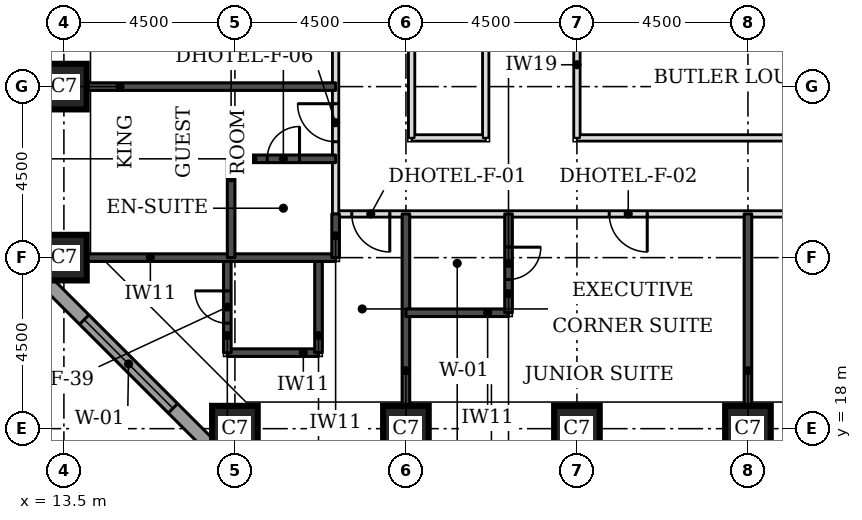
"""IFC4 building model, lengths in metres.
Left out: names, types, materials, properties, quantities, classifications, styles, units other than length and angle.
Written with IfcOpenShell. Run it as: python <this file> out.ifc"""

import sys

from ifc_helpers import new_model, si_unit, direction, frame, frame_2d, origin, origin_2d, place, context, subcontext, project, spatial, rectangle, extrude, element, fill, save


model = new_model("IFC4")
c1 = context("Model", 3, precision=1e-05, world=origin(), true_north=direction((0.0, 1.0)))
c2 = subcontext(c1, "Body", "Model", "MODEL_VIEW")
j1 = project(units=[si_unit("LENGTHUNIT", "METRE"), si_unit("PLANEANGLEUNIT", "RADIAN")], contexts=[c1])
p1 = place(None, origin())
s1 = spatial("IfcSite", under=j1, at=p1, CompositionType="ELEMENT")
p2 = place(p1, origin())
s2 = spatial("IfcBuilding", under=s1, at=p2, CompositionType="ELEMENT")
p3 = place(p2, frame((0.0, 0.0, 42.9)))
s3 = spatial("IfcBuildingStorey", under=s2, at=p3, CompositionType="ELEMENT", Elevation=42.9)
for number, where, z_axis, x_axis in (
    (1, (18.0, 18.0, 0.0), (0.0, 0.0, 1.0), (1.0, 0.0, 0.0)),
    (2, (22.5, 18.0, 0.0), (0.0, 0.0, 1.0), (1.0, 0.0, 0.0)),
    (3, (27.0, 18.0, 0.0), (0.0, 0.0, 1.0), (1.0, 0.0, 0.0)),
    (4, (31.5, 18.0, 0.0), (0.0, 0.0, 1.0), (1.0, 0.0, 0.0)),
    (5, (13.5, 22.5, 0.0), (0.0, 0.0, 1.0), (1.0, 0.0, 0.0)),
    (6, (13.5, 27.0, 0.0), (0.0, 0.0, 1.0), (1.0, 0.0, 0.0)),
):
    element("IfcColumn", number, at=place(p3, frame(where, z_axis=z_axis, x_axis=x_axis)), inside=s3, PredefinedType="COLUMN", context=c2, shape_type="SweptSolid", body=[
        extrude(rectangle(XDim=1.2, YDim=1.2, at=origin_2d()), origin(), (0.0, 0.0, 1.0), 3.3),
    ])
p4 = place(p3, frame((12.674, 22.23, 0.0), z_axis=(0.0, 0.0, 1.0), x_axis=(0.707106781187, -0.707106781187, 0.0)))
e7 = element("IfcWall", 7, at=p4, inside=s3, PredefinedType="STANDARD", context=c2, shape_type="SweptSolid", body=[
    extrude(rectangle(XDim=7.151, YDim=0.35, at=frame_2d((3.576, 0.0))), origin(), (0.0, 0.0, 1.0), 3.055),
])
p5 = place(p4, frame((1.926, 0.0, 0.8)))
e8 = element("IfcOpeningElement", 8, at=p5, cuts=e7, PredefinedType="OPENING", context=c2, shape_type="SweptSolid", body=[
    extrude(rectangle(XDim=3.3, YDim=1.5, at=frame_2d((1.65, 0.75))), frame((0.0, 0.185, 0.0), z_axis=(0.0, -1.0, 0.0), x_axis=(1.0, 0.0, 0.0)), (0.0, 0.0, 1.0), 0.37),
])
p6 = place(p3, frame((20.65, 23.65, 0.0), z_axis=(0.0, 0.0, 1.0), x_axis=(1.0, 0.0, 0.0)))
e9 = element("IfcWall", 9, at=p6, inside=s3, PredefinedType="PARTITIONING", context=c2, shape_type="SweptSolid", body=[
    extrude(rectangle(XDim=30.85, YDim=0.15, at=frame_2d((15.425, 0.0))), origin(), (0.0, 0.0, 1.0), 3.08),
])
p7 = place(p6, frame((7.2, 0.0, 0.0)))
e10 = element("IfcOpeningElement", 10, at=p7, cuts=e9, PredefinedType="OPENING", context=c2, shape_type="SweptSolid", body=[
    extrude(rectangle(XDim=1.0, YDim=2.1, at=frame_2d((0.5, 1.05))), frame((0.0, 0.085, 0.0), z_axis=(0.0, -1.0, 0.0), x_axis=(1.0, 0.0, 0.0)), (0.0, 0.0, 1.0), 0.17),
])
p8 = place(p6, frame((13.25, 0.0, 0.0)))
e11 = element("IfcOpeningElement", 11, at=p8, cuts=e9, PredefinedType="OPENING", context=c2, shape_type="SweptSolid", body=[
    extrude(rectangle(XDim=1.0, YDim=2.1, at=frame_2d((0.5, 1.05))), frame((0.0, 0.085, 0.0), z_axis=(0.0, -1.0, 0.0), x_axis=(1.0, 0.0, 0.0)), (0.0, 0.0, 1.0), 0.17),
])
p9 = place(p6, frame((25.2, 0.0, 0.0)))
e12 = element("IfcOpeningElement", 12, at=p9, cuts=e9, PredefinedType="OPENING", context=c2, shape_type="SweptSolid", body=[
    extrude(rectangle(XDim=1.0, YDim=2.1, at=frame_2d((0.5, 1.05))), frame((0.0, 0.085, 0.0), z_axis=(0.0, -1.0, 0.0), x_axis=(1.0, 0.0, 0.0)), (0.0, 0.0, 1.0), 0.17),
])
p10 = place(p6, frame((0.425, 0.0, 0.0)))
e13 = element("IfcOpeningElement", 13, at=p10, cuts=e9, PredefinedType="OPENING", context=c2, shape_type="SweptSolid", body=[
    extrude(rectangle(XDim=1.0, YDim=2.1, at=frame_2d((0.5, 1.05))), frame((0.0, 0.085, 0.0), z_axis=(0.0, -1.0, 0.0), x_axis=(1.0, 0.0, 0.0)), (0.0, 0.0, 1.0), 0.17),
])
p11 = place(p6, frame((29.35, 0.0, 0.0)))
e14 = element("IfcOpeningElement", 14, at=p11, cuts=e9, PredefinedType="OPENING", context=c2, shape_type="SweptSolid", body=[
    extrude(rectangle(XDim=1.0, YDim=2.1, at=frame_2d((0.5, 1.05))), frame((0.0, 0.085, 0.0), z_axis=(0.0, -1.0, 0.0), x_axis=(1.0, 0.0, 0.0)), (0.0, 0.0, 1.0), 0.17),
])
p12 = place(p3, frame((20.65, 23.65, 0.0), z_axis=(0.0, 0.0, 1.0), x_axis=(0.0, 1.0, 0.0)))
e15 = element("IfcWall", 15, at=p12, inside=s3, PredefinedType="PARTITIONING", context=c2, shape_type="SweptSolid", body=[
    extrude(rectangle(XDim=25.85, YDim=0.15, at=frame_2d((12.925, 0.0))), origin(), (0.0, 0.0, 1.0), 3.08),
])
p13 = place(p12, frame((1.9, 0.0, 0.0)))
e16 = element("IfcOpeningElement", 16, at=p13, cuts=e15, PredefinedType="OPENING", context=c2, shape_type="SweptSolid", body=[
    extrude(rectangle(XDim=1.0, YDim=2.1, at=frame_2d((0.5, 1.05))), frame((0.0, 0.085, 0.0), z_axis=(0.0, -1.0, 0.0), x_axis=(1.0, 0.0, 0.0)), (0.0, 0.0, 1.0), 0.17),
])
p14 = place(p12, frame((6.0, 0.0, 0.0)))
e17 = element("IfcOpeningElement", 17, at=p14, cuts=e15, PredefinedType="OPENING", context=c2, shape_type="SweptSolid", body=[
    extrude(rectangle(XDim=1.0, YDim=2.1, at=frame_2d((0.5, 1.05))), frame((0.0, 0.085, 0.0), z_axis=(0.0, -1.0, 0.0), x_axis=(1.0, 0.0, 0.0)), (0.0, 0.0, 1.0), 0.17),
])
p15 = place(p12, frame((17.95, 0.0, 0.0)))
e18 = element("IfcOpeningElement", 18, at=p15, cuts=e15, PredefinedType="OPENING", context=c2, shape_type="SweptSolid", body=[
    extrude(rectangle(XDim=1.0, YDim=2.1, at=frame_2d((0.5, 1.05))), frame((0.0, 0.085, 0.0), z_axis=(0.0, -1.0, 0.0), x_axis=(1.0, 0.0, 0.0)), (0.0, 0.0, 1.0), 0.17),
])
p16 = place(p12, frame((23.04, 0.0, 0.0)))
e19 = element("IfcOpeningElement", 19, at=p16, cuts=e15, PredefinedType="OPENING", context=c2, shape_type="SweptSolid", body=[
    extrude(rectangle(XDim=0.9, YDim=2.1, at=frame_2d((0.45, 1.05))), frame((0.0, 0.085, 0.0), z_axis=(0.0, -1.0, 0.0), x_axis=(1.0, 0.0, 0.0)), (0.0, 0.0, 1.0), 0.17),
])
p17 = place(p3, frame((22.65, 25.65, 0.0), z_axis=(0.0, 0.0, 1.0), x_axis=(1.0, 0.0, 0.0)))
e20 = element("IfcWall", 20, at=p17, inside=s3, PredefinedType="PARTITIONING", context=c2, shape_type="SweptSolid", body=[
    extrude(rectangle(XDim=1.95, YDim=0.15, at=frame_2d((0.975, 0.0))), origin(), (0.0, 0.0, 1.0), 3.08),
])
p18 = place(p3, frame((22.65, 25.65, 0.0), z_axis=(0.0, 0.0, 1.0), x_axis=(0.0, 1.0, 0.0)))
e21 = element("IfcWall", 21, at=p18, inside=s3, PredefinedType="PARTITIONING", context=c2, shape_type="SweptSolid", body=[
    extrude(rectangle(XDim=17.35, YDim=0.15, at=frame_2d((8.675, 0.0))), origin(), (0.0, 0.0, 1.0), 3.08),
])
p19 = place(p18, frame((3.3, 0.0, 0.0)))
e22 = element("IfcOpeningElement", 22, at=p19, cuts=e21, PredefinedType="OPENING", context=c2, shape_type="SweptSolid", body=[
    extrude(rectangle(XDim=0.9, YDim=2.1, at=frame_2d((0.45, 1.05))), frame((0.0, 0.085, 0.0), z_axis=(0.0, -1.0, 0.0), x_axis=(1.0, 0.0, 0.0)), (0.0, 0.0, 1.0), 0.17),
])
p20 = place(p3, frame((24.6, 25.65, 0.0), z_axis=(0.0, 0.0, 1.0), x_axis=(0.0, 1.0, 0.0)))
e23 = element("IfcWall", 23, at=p20, inside=s3, PredefinedType="PARTITIONING", context=c2, shape_type="SweptSolid", body=[
    extrude(rectangle(XDim=14.85, YDim=0.15, at=frame_2d((7.425, 0.0))), origin(), (0.0, 0.0, 1.0), 3.08),
])
p21 = place(p3, frame((27.0, 25.65, 0.0), z_axis=(0.0, 0.0, 1.0), x_axis=(1.0, 0.0, 0.0)))
e24 = element("IfcWall", 24, at=p21, inside=s3, PredefinedType="PARTITIONING", context=c2, shape_type="SweptSolid", body=[
    extrude(rectangle(XDim=11.5, YDim=0.15, at=frame_2d((5.75, 0.0))), origin(), (0.0, 0.0, 1.0), 3.08),
])
p22 = place(p3, frame((27.0, 25.65, 0.0), z_axis=(0.0, 0.0, 1.0), x_axis=(0.0, 1.0, 0.0)))
e25 = element("IfcWall", 25, at=p22, inside=s3, PredefinedType="PARTITIONING", context=c2, shape_type="SweptSolid", body=[
    extrude(rectangle(XDim=3.85, YDim=0.15, at=frame_2d((1.925, 0.0))), origin(), (0.0, 0.0, 1.0), 3.08),
])
for number, where, z_axis, x_axis in (
    (26, (22.5, 18.6, 0.0), (0.0, 0.0, 1.0), (0.0, 1.0, 0.0)),
    (27, (31.5, 18.6, 0.0), (0.0, 0.0, 1.0), (0.0, 1.0, 0.0)),
):
    element("IfcWall", number, at=place(p3, frame(where, z_axis=z_axis, x_axis=x_axis)), inside=s3, PredefinedType="SOLIDWALL", context=c2, shape_type="SweptSolid", body=[
        extrude(rectangle(XDim=5.05, YDim=0.2, at=frame_2d((2.525, 0.0))), origin(), (0.0, 0.0, 1.0), 3.08),
    ])
p23 = place(p3, frame((17.8, 20.0, 0.0), z_axis=(0.0, 0.0, 1.0), x_axis=(1.0, 0.0, 0.0)))
e28 = element("IfcWall", 28, at=p23, inside=s3, PredefinedType="SOLIDWALL", context=c2, shape_type="SweptSolid", body=[
    extrude(rectangle(XDim=2.4, YDim=0.2, at=frame_2d((1.2, 0.0))), origin(), (0.0, 0.0, 1.0), 3.08),
])
p24 = place(p3, frame((17.8, 20.0, 0.0), z_axis=(0.0, 0.0, 1.0), x_axis=(0.0, 1.0, 0.0)))
e29 = element("IfcWall", 29, at=p24, inside=s3, PredefinedType="SOLIDWALL", context=c2, shape_type="SweptSolid", body=[
    extrude(rectangle(XDim=2.5, YDim=0.2, at=frame_2d((1.25, 0.0))), origin(), (0.0, 0.0, 1.0), 3.08),
])
p25 = place(p24, frame((0.775, 0.0, 0.0)))
e30 = element("IfcOpeningElement", 30, at=p25, cuts=e29, PredefinedType="OPENING", context=c2, shape_type="SweptSolid", body=[
    extrude(rectangle(XDim=0.85, YDim=2.1, at=frame_2d((0.425, 1.05))), frame((0.0, 0.11, 0.0), z_axis=(0.0, -1.0, 0.0), x_axis=(1.0, 0.0, 0.0)), (0.0, 0.0, 1.0), 0.22),
])
p26 = place(p3, frame((20.2, 20.0, 0.0), z_axis=(0.0, 0.0, 1.0), x_axis=(0.0, 1.0, 0.0)))
e31 = element("IfcWall", 31, at=p26, inside=s3, PredefinedType="SOLIDWALL", context=c2, shape_type="SweptSolid", body=[
    extrude(rectangle(XDim=2.5, YDim=0.2, at=frame_2d((1.25, 0.0))), origin(), (0.0, 0.0, 1.0), 3.08),
])
p27 = place(p3, frame((22.5, 21.05, 0.0), z_axis=(0.0, 0.0, 1.0), x_axis=(1.0, 0.0, 0.0)))
e32 = element("IfcWall", 32, at=p27, inside=s3, PredefinedType="SOLIDWALL", context=c2, shape_type="SweptSolid", body=[
    extrude(rectangle(XDim=2.7, YDim=0.2, at=frame_2d((1.35, 0.0))), origin(), (0.0, 0.0, 1.0), 3.08),
])
p28 = place(p3, frame((25.2, 21.05, 0.0), z_axis=(0.0, 0.0, 1.0), x_axis=(0.0, 1.0, 0.0)))
e33 = element("IfcWall", 33, at=p28, inside=s3, PredefinedType="SOLIDWALL", context=c2, shape_type="SweptSolid", body=[
    extrude(rectangle(XDim=2.6, YDim=0.2, at=frame_2d((1.3, 0.0))), origin(), (0.0, 0.0, 1.0), 3.08),
])
p29 = place(p28, frame((0.875, 0.0, 0.0)))
e34 = element("IfcOpeningElement", 34, at=p29, cuts=e33, PredefinedType="OPENING", context=c2, shape_type="SweptSolid", body=[
    extrude(rectangle(XDim=0.85, YDim=2.1, at=frame_2d((0.425, 1.05))), frame((0.0, 0.11, 0.0), z_axis=(0.0, -1.0, 0.0), x_axis=(1.0, 0.0, 0.0)), (0.0, 0.0, 1.0), 0.22),
])
p30 = place(p3, frame((14.1, 22.5, 0.0), z_axis=(0.0, 0.0, 1.0), x_axis=(1.0, 0.0, 0.0)))
e35 = element("IfcWall", 35, at=p30, inside=s3, PredefinedType="SOLIDWALL", context=c2, shape_type="SweptSolid", body=[
    extrude(rectangle(XDim=6.55, YDim=0.2, at=frame_2d((3.275, 0.0))), origin(), (0.0, 0.0, 1.0), 3.08),
])
p31 = place(p3, frame((17.9, 22.5, 0.0), z_axis=(0.0, 0.0, 1.0), x_axis=(0.0, 1.0, 0.0)))
e36 = element("IfcWall", 36, at=p31, inside=s3, PredefinedType="SOLIDWALL", context=c2, shape_type="SweptSolid", body=[
    extrude(rectangle(XDim=2.6, YDim=0.2, at=frame_2d((1.3, 0.0))), origin(), (0.0, 0.0, 1.0), 3.08),
])
p32 = place(p3, frame((20.65, 22.5, 0.0), z_axis=(0.0, 0.0, 1.0), x_axis=(0.0, 1.0, 0.0)))
e37 = element("IfcWall", 37, at=p32, inside=s3, PredefinedType="SOLIDWALL", context=c2, shape_type="SweptSolid", body=[
    extrude(rectangle(XDim=1.15, YDim=0.2, at=frame_2d((0.575, 0.0))), origin(), (0.0, 0.0, 1.0), 3.08),
])
p33 = place(p3, frame((17.9, 25.1, 0.0), z_axis=(0.0, 0.0, 1.0), x_axis=(1.0, 0.0, 0.0)))
e38 = element("IfcWall", 38, at=p33, inside=s3, PredefinedType="SOLIDWALL", context=c2, shape_type="SweptSolid", body=[
    extrude(rectangle(XDim=2.75, YDim=0.2, at=frame_2d((1.375, 0.0))), origin(), (0.0, 0.0, 1.0), 3.08),
])
p34 = place(p33, frame((0.95, 0.0, 0.0)))
e39 = element("IfcOpeningElement", 39, at=p34, cuts=e38, PredefinedType="OPENING", context=c2, shape_type="SweptSolid", body=[
    extrude(rectangle(XDim=0.85, YDim=2.1, at=frame_2d((0.425, 1.05))), frame((0.0, 0.11, 0.0), z_axis=(0.0, -1.0, 0.0), x_axis=(1.0, 0.0, 0.0)), (0.0, 0.0, 1.0), 0.22),
])
p35 = place(p3, frame((14.1, 27.0, 0.0), z_axis=(0.0, 0.0, 1.0), x_axis=(1.0, 0.0, 0.0)))
e40 = element("IfcWall", 40, at=p35, inside=s3, PredefinedType="SOLIDWALL", context=c2, shape_type="SweptSolid", body=[
    extrude(rectangle(XDim=6.55, YDim=0.2, at=frame_2d((3.275, 0.0))), origin(), (0.0, 0.0, 1.0), 3.08),
])
p36 = place(p5, origin())
e41 = element("IfcWindow", 41, at=p36, inside=s3, PartitioningType="SINGLE_PANEL", PredefinedType="WINDOW", context=c2, shape_type="SweptSolid", body=[
    extrude(rectangle(XDim=3.3, YDim=1.5, at=frame_2d((1.65, 0.75))), frame((0.0, 0.085, 0.0), z_axis=(0.0, -1.0, 0.0), x_axis=(1.0, 0.0, 0.0)), (0.0, 0.0, 1.0), 0.06),
])
fill(e8, e41)
p37 = place(p7, frame((1.0, 0.0, 0.0), z_axis=(0.0, 0.0, 1.0), x_axis=(-1.0, 0.0, 0.0)))
e42 = element("IfcDoor", 42, at=p37, inside=s3, OperationType="SINGLE_SWING_LEFT", PredefinedType="DOOR", context=c2, shape_type="SweptSolid", body=[
    extrude(rectangle(XDim=1.0, YDim=2.1, at=frame_2d((0.5, 1.05))), frame((0.0, 0.025, 0.0), z_axis=(0.0, -1.0, 0.0), x_axis=(1.0, 0.0, 0.0)), (0.0, 0.0, 1.0), 0.05),
])
fill(e10, e42)
p38 = place(p29, frame((0.85, 0.0, 0.0), z_axis=(0.0, 0.0, 1.0), x_axis=(-1.0, 0.0, 0.0)))
e43 = element("IfcDoor", 43, at=p38, inside=s3, OperationType="SINGLE_SWING_LEFT", PredefinedType="DOOR", context=c2, shape_type="SweptSolid", body=[
    extrude(rectangle(XDim=0.85, YDim=2.1, at=frame_2d((0.425, 1.05))), frame((0.0, 0.025, 0.0), z_axis=(0.0, -1.0, 0.0), x_axis=(1.0, 0.0, 0.0)), (0.0, 0.0, 1.0), 0.05),
])
fill(e34, e43)
p39 = place(p13, origin())
e44 = element("IfcDoor", 44, at=p39, inside=s3, OperationType="SINGLE_SWING_RIGHT", PredefinedType="DOOR", context=c2, shape_type="SweptSolid", body=[
    extrude(rectangle(XDim=1.0, YDim=2.1, at=frame_2d((0.5, 1.05))), frame((0.0, 0.025, 0.0), z_axis=(0.0, -1.0, 0.0), x_axis=(1.0, 0.0, 0.0)), (0.0, 0.0, 1.0), 0.05),
])
fill(e16, e44)
p40 = place(p34, origin())
e45 = element("IfcDoor", 45, at=p40, inside=s3, OperationType="SINGLE_SWING_RIGHT", PredefinedType="DOOR", context=c2, shape_type="SweptSolid", body=[
    extrude(rectangle(XDim=0.85, YDim=2.1, at=frame_2d((0.425, 1.05))), frame((0.0, 0.025, 0.0), z_axis=(0.0, -1.0, 0.0), x_axis=(1.0, 0.0, 0.0)), (0.0, 0.0, 1.0), 0.05),
])
fill(e39, e45)
p41 = place(p10, frame((1.0, 0.0, 0.0), z_axis=(0.0, 0.0, 1.0), x_axis=(-1.0, 0.0, 0.0)))
e46 = element("IfcDoor", 46, at=p41, inside=s3, OperationType="SINGLE_SWING_LEFT", PredefinedType="DOOR", context=c2, shape_type="SweptSolid", body=[
    extrude(rectangle(XDim=1.0, YDim=2.1, at=frame_2d((0.5, 1.05))), frame((0.0, 0.025, 0.0), z_axis=(0.0, -1.0, 0.0), x_axis=(1.0, 0.0, 0.0)), (0.0, 0.0, 1.0), 0.05),
])
fill(e13, e46)
p42 = place(p25, origin())
e47 = element("IfcDoor", 47, at=p42, inside=s3, OperationType="SINGLE_SWING_RIGHT", PredefinedType="DOOR", context=c2, shape_type="SweptSolid", body=[
    extrude(rectangle(XDim=0.85, YDim=2.1, at=frame_2d((0.425, 1.05))), frame((0.0, 0.025, 0.0), z_axis=(0.0, -1.0, 0.0), x_axis=(1.0, 0.0, 0.0)), (0.0, 0.0, 1.0), 0.05),
])
fill(e30, e47)
save(model, sys.argv[1])
